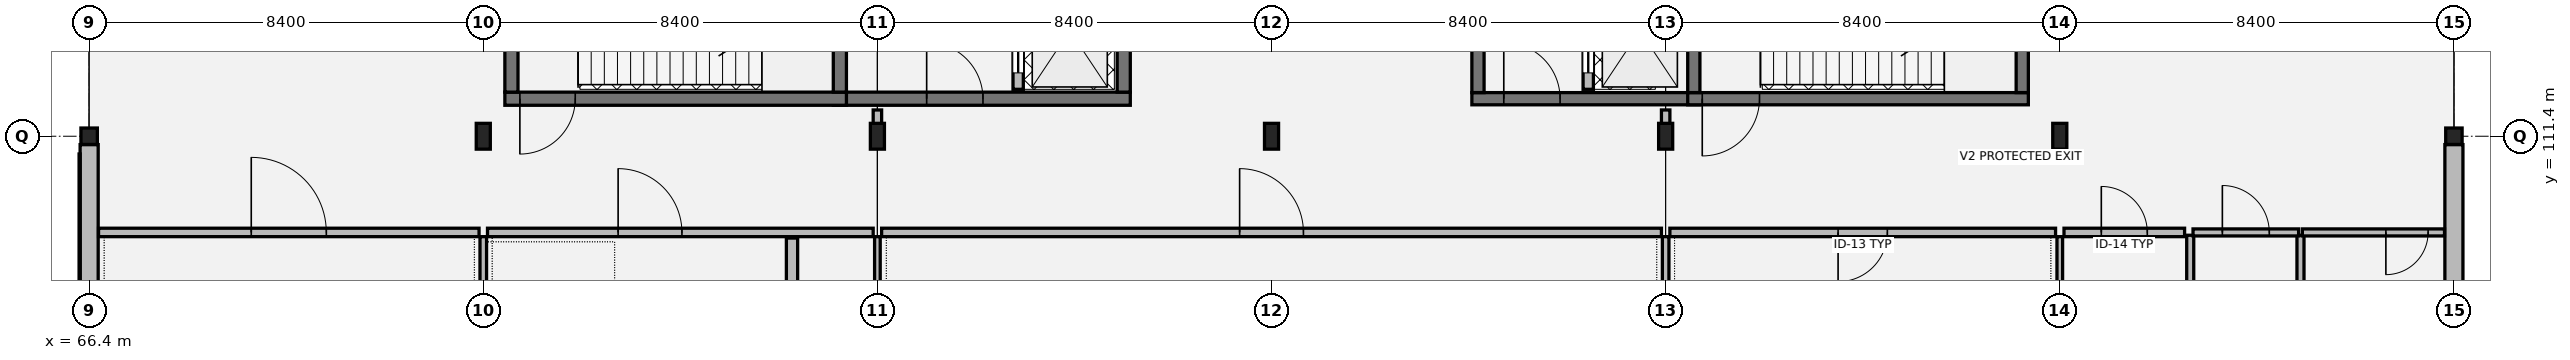
"""IFC4 building model, lengths in metres.
Left out: names, types, materials, properties, quantities, classifications, styles, units other than length and angle.
Written with IfcOpenShell. Run it as: python <this file> out.ifc"""

import sys

from ifc_helpers import new_model, si_unit, direction, frame, frame_2d, origin, origin_2d, place, context, subcontext, project, spatial, rectangle, hollow_rectangle, i_section, extrude, element, fill, save


model = new_model("IFC4")
c1 = context("Model", 3, precision=1e-05, world=origin(), true_north=direction((0.0, 1.0)))
c2 = subcontext(c1, "Body", "Model", "MODEL_VIEW")
j1 = project(units=[si_unit("LENGTHUNIT", "METRE"), si_unit("PLANEANGLEUNIT", "RADIAN")], contexts=[c1])
p1 = place(None, origin())
s1 = spatial("IfcSite", under=j1, at=p1, CompositionType="ELEMENT")
p2 = place(p1, origin())
s2 = spatial("IfcBuilding", under=s1, at=p2, CompositionType="ELEMENT")
p3 = place(p2, origin())
s3 = spatial("IfcBuildingStorey", under=s2, at=p3, CompositionType="ELEMENT", Elevation=0.0)
p4 = place(p3, frame((66.4, 111.4, 0.0), z_axis=(0.0, 0.0, 1.0), x_axis=(1.0, 0.0, 0.0)))
e1 = element("IfcColumn", 1, at=p4, inside=s3, PredefinedType="COLUMN", context=c2, shape_type="SweptSolid", body=[
    extrude(hollow_rectangle(XDim=0.35, YDim=0.35, WallThickness=0.014, at=origin_2d()), origin(), (0.0, 0.0, 1.0), 5.075),
])
for number, where, z_axis, x_axis in (
    (2, (74.8, 111.4, 0.0), (0.0, 0.0, 1.0), (1.0, 0.0, 0.0)),
    (3, (83.2, 111.4, 0.0), (0.0, 0.0, 1.0), (1.0, 0.0, 0.0)),
    (4, (91.6, 111.4, 0.0), (0.0, 0.0, 1.0), (1.0, 0.0, 0.0)),
    (5, (100.0, 111.4, 0.0), (0.0, 0.0, 1.0), (1.0, 0.0, 0.0)),
    (6, (108.4, 111.4, 0.0), (0.0, 0.0, 1.0), (1.0, 0.0, 0.0)),
):
    element("IfcColumn", number, at=place(p3, frame(where, z_axis=z_axis, x_axis=x_axis)), inside=s3, PredefinedType="COLUMN", context=c2, shape_type="SweptSolid", body=[
        extrude(i_section(OverallWidth=0.3, OverallDepth=0.55, WebThickness=0.015, FlangeThickness=0.029, at=origin_2d()), origin(), (0.0, 0.0, 1.0), 5.075),
    ])
p5 = place(p3, frame((116.8, 111.4, 0.0), z_axis=(0.0, 0.0, 1.0), x_axis=(1.0, 0.0, 0.0)))
e7 = element("IfcColumn", 7, at=p5, inside=s3, PredefinedType="COLUMN", context=c2, shape_type="SweptSolid", body=[
    extrude(hollow_rectangle(XDim=0.35, YDim=0.35, WallThickness=0.014, at=origin_2d()), origin(), (0.0, 0.0, 1.0), 5.075),
])
for number, where, z_axis, x_axis in (
    (8, (116.8, 103.978, 0.0), (0.0, 0.0, 1.0), (0.0, 1.0, 0.0)),
    (9, (66.4, 111.222, 0.0), (0.0, 0.0, 1.0), (0.0, -1.0, 0.0)),
):
    element("IfcWall", number, at=place(p3, frame(where, z_axis=z_axis, x_axis=x_axis)), inside=s3, PredefinedType="SOLIDWALL", context=c2, shape_type="SweptSolid", body=[
        extrude(rectangle(XDim=7.244, YDim=0.385, at=frame_2d((3.622, 0.0))), origin(), (0.0, 0.0, 1.0), 4.5),
    ])
p6 = place(p3, frame((82.26, 112.2, 0.0), z_axis=(0.0, 0.0, 1.0), x_axis=(1.0, 0.0, 0.0)))
e10 = element("IfcWall", 10, at=p6, inside=s3, PredefinedType="SHEAR", context=c2, shape_type="SweptSolid", body=[
    extrude(rectangle(XDim=6.33, YDim=0.28, at=frame_2d((3.165, 0.0))), origin(), (0.0, 0.0, 1.0), 4.865),
])
p7 = place(p6, frame((1.99, 0.0, 0.0)))
e11 = element("IfcOpeningElement", 11, at=p7, cuts=e10, PredefinedType="OPENING", context=c2, shape_type="SweptSolid", body=[
    extrude(rectangle(XDim=1.2, YDim=2.16, at=frame_2d((0.6, 1.08))), frame((0.0, 0.15, 0.0), z_axis=(0.0, -1.0, 0.0), x_axis=(1.0, 0.0, 0.0)), (0.0, 0.0, 1.0), 0.3),
])
p8 = place(p3, frame((88.45, 112.34, 0.0), z_axis=(0.0, 0.0, 1.0), x_axis=(0.0, 1.0, 0.0)))
e12 = element("IfcWall", 12, at=p8, inside=s3, PredefinedType="SHEAR", context=c2, shape_type="SweptSolid", body=[
    extrude(rectangle(XDim=5.72, YDim=0.28, at=frame_2d((2.86, 0.0))), origin(), (0.0, 0.0, 1.0), 4.865),
])
p9 = place(p3, frame((86.2, 112.4, 0.0), z_axis=(0.0, 0.0, 1.0), x_axis=(0.0, 1.0, 0.0)))
e13 = element("IfcWall", 13, at=p9, inside=s3, PredefinedType="SOLIDWALL", context=c2, shape_type="SweptSolid", body=[
    extrude(rectangle(XDim=5.6, YDim=0.22, at=frame_2d((2.8, 0.0))), origin(), (0.0, 0.0, 1.0), 4.865),
])
p10 = place(p9, frame((0.35, 0.0, 0.0)))
e14 = element("IfcOpeningElement", 14, at=p10, cuts=e13, PredefinedType="OPENING", context=c2, shape_type="SweptSolid", body=[
    extrude(rectangle(XDim=1.1, YDim=2.15, at=frame_2d((0.55, 1.075))), frame((0.0, 0.12, 0.0), z_axis=(0.0, -1.0, 0.0), x_axis=(1.0, 0.0, 0.0)), (0.0, 0.0, 1.0), 0.24),
])
p11 = place(p9, frame((2.4, 0.0, 0.0)))
e15 = element("IfcOpeningElement", 15, at=p11, cuts=e13, PredefinedType="OPENING", context=c2, shape_type="SweptSolid", body=[
    extrude(rectangle(XDim=1.1, YDim=2.15, at=frame_2d((0.55, 1.075))), frame((0.0, 0.12, 0.0), z_axis=(0.0, -1.0, 0.0), x_axis=(1.0, 0.0, 0.0)), (0.0, 0.0, 1.0), 0.24),
])
p12 = place(p3, frame((75.26, 112.2, 0.0), z_axis=(0.0, 0.0, 1.0), x_axis=(1.0, 0.0, 0.0)))
e16 = element("IfcWall", 16, at=p12, inside=s3, PredefinedType="SHEAR", context=c2, shape_type="SweptSolid", body=[
    extrude(rectangle(XDim=7.28, YDim=0.28, at=frame_2d((3.64, 0.0))), origin(), (0.0, 0.0, 1.0), 4.865),
])
p13 = place(p12, frame((0.32, 0.0, 0.0)))
e17 = element("IfcOpeningElement", 17, at=p13, cuts=e16, PredefinedType="OPENING", context=c2, shape_type="SweptSolid", body=[
    extrude(rectangle(XDim=1.18, YDim=2.18, at=frame_2d((0.59, 1.09))), frame((0.0, 0.15, 0.0), z_axis=(0.0, -1.0, 0.0), x_axis=(1.0, 0.0, 0.0)), (0.0, 0.0, 1.0), 0.3),
])
for number, where, z_axis, x_axis in (
    (18, (75.4, 112.34, 0.0), (0.0, 0.0, 1.0), (0.0, 1.0, 0.0)),
    (19, (82.4, 112.34, 0.0), (0.0, 0.0, 1.0), (0.0, 1.0, 0.0)),
):
    element("IfcWall", number, at=place(p3, frame(where, z_axis=z_axis, x_axis=x_axis)), inside=s3, PredefinedType="SHEAR", context=c2, shape_type="SweptSolid", body=[
        extrude(rectangle(XDim=5.72, YDim=0.28, at=frame_2d((2.86, 0.0))), origin(), (0.0, 0.0, 1.0), 4.865),
    ])
p14 = place(p3, frame((95.87, 112.2, 0.0), z_axis=(0.0, 0.0, 1.0), x_axis=(1.0, 0.0, 0.0)))
e20 = element("IfcWall", 20, at=p14, inside=s3, PredefinedType="SHEAR", context=c2, shape_type="SweptSolid", body=[
    extrude(rectangle(XDim=4.86, YDim=0.26, at=frame_2d((2.43, 0.0))), origin(), (0.0, 0.0, 1.0), 4.865),
])
p15 = place(p14, frame((0.68, 0.0, 0.0)))
e21 = element("IfcOpeningElement", 21, at=p15, cuts=e20, PredefinedType="OPENING", context=c2, shape_type="SweptSolid", body=[
    extrude(rectangle(XDim=1.2, YDim=2.16, at=frame_2d((0.6, 1.08))), frame((0.0, 0.14, 0.0), z_axis=(0.0, -1.0, 0.0), x_axis=(1.0, 0.0, 0.0)), (0.0, 0.0, 1.0), 0.28),
])
p16 = place(p3, frame((96.0, 118.07, 0.0), z_axis=(0.0, 0.0, 1.0), x_axis=(0.0, -1.0, 0.0)))
e22 = element("IfcWall", 22, at=p16, inside=s3, PredefinedType="SHEAR", context=c2, shape_type="SweptSolid", body=[
    extrude(rectangle(XDim=5.74, YDim=0.26, at=frame_2d((2.87, 0.0))), origin(), (0.0, 0.0, 1.0), 4.865),
])
p17 = place(p3, frame((98.35, 112.4, 0.0), z_axis=(0.0, 0.0, 1.0), x_axis=(0.0, 1.0, 0.0)))
e23 = element("IfcWall", 23, at=p17, inside=s3, PredefinedType="SOLIDWALL", context=c2, shape_type="SweptSolid", body=[
    extrude(rectangle(XDim=5.6, YDim=0.22, at=frame_2d((2.8, 0.0))), origin(), (0.0, 0.0, 1.0), 4.865),
])
p18 = place(p17, frame((0.35, 0.0, 0.0)))
e24 = element("IfcOpeningElement", 24, at=p18, cuts=e23, PredefinedType="OPENING", context=c2, shape_type="SweptSolid", body=[
    extrude(rectangle(XDim=1.1, YDim=2.15, at=frame_2d((0.55, 1.075))), frame((0.0, 0.12, 0.0), z_axis=(0.0, -1.0, 0.0), x_axis=(1.0, 0.0, 0.0)), (0.0, 0.0, 1.0), 0.24),
])
p19 = place(p3, frame((100.47, 112.2, 0.0), z_axis=(0.0, 0.0, 1.0), x_axis=(1.0, 0.0, 0.0)))
e25 = element("IfcWall", 25, at=p19, inside=s3, PredefinedType="SHEAR", context=c2, shape_type="SweptSolid", body=[
    extrude(rectangle(XDim=7.26, YDim=0.26, at=frame_2d((3.63, 0.0))), origin(), (0.0, 0.0, 1.0), 4.865),
])
p20 = place(p19, frame((0.31, 0.0, 0.0)))
e26 = element("IfcOpeningElement", 26, at=p20, cuts=e25, PredefinedType="OPENING", context=c2, shape_type="SweptSolid", body=[
    extrude(rectangle(XDim=1.22, YDim=2.18, at=frame_2d((0.61, 1.09))), frame((0.0, 0.14, 0.0), z_axis=(0.0, -1.0, 0.0), x_axis=(1.0, 0.0, 0.0)), (0.0, 0.0, 1.0), 0.28),
])
for number, where, z_axis, x_axis in (
    (27, (100.6, 112.33, 0.0), (0.0, 0.0, 1.0), (0.0, 1.0, 0.0)),
    (28, (107.6, 112.33, 0.0), (0.0, 0.0, 1.0), (0.0, 1.0, 0.0)),
):
    element("IfcWall", number, at=place(p3, frame(where, z_axis=z_axis, x_axis=x_axis)), inside=s3, PredefinedType="SHEAR", context=c2, shape_type="SweptSolid", body=[
        extrude(rectangle(XDim=5.74, YDim=0.26, at=frame_2d((2.87, 0.0))), origin(), (0.0, 0.0, 1.0), 4.865),
    ])
for number, where, z_axis, x_axis in (
    (29, (111.18, 106.93, 0.0), (0.0, 0.0, 1.0), (0.0, 1.0, 0.0)),
    (30, (113.53, 106.93, 0.0), (0.0, 0.0, 1.0), (0.0, 1.0, 0.0)),
):
    element("IfcWall", number, at=place(p3, frame(where, z_axis=z_axis, x_axis=x_axis)), inside=s3, PredefinedType="PARTITIONING", context=c2, shape_type="SweptSolid", body=[
        extrude(rectangle(XDim=2.36, YDim=0.15, at=frame_2d((1.18, 0.0))), origin(), (0.0, 0.0, 1.0), 4.2),
    ])
p21 = place(p3, frame((111.24, 109.35, 0.0), z_axis=(0.0, 0.0, 1.0), x_axis=(1.0, 0.0, 0.0)))
e31 = element("IfcWall", 31, at=p21, inside=s3, PredefinedType="PARTITIONING", context=c2, shape_type="SweptSolid", body=[
    extrude(rectangle(XDim=2.25, YDim=0.15, at=frame_2d((1.125, 0.0))), origin(), (0.0, 0.0, 1.0), 4.2),
])
p22 = place(p21, frame((0.625, 0.0, 0.0)))
e32 = element("IfcOpeningElement", 32, at=p22, cuts=e31, PredefinedType="OPENING", context=c2, shape_type="SweptSolid", body=[
    extrude(rectangle(XDim=1.0, YDim=2.15, at=frame_2d((0.5, 1.075))), frame((0.0, 0.085, 0.0), z_axis=(0.0, -1.0, 0.0), x_axis=(1.0, 0.0, 0.0)), (0.0, 0.0, 1.0), 0.17),
])
p23 = place(p3, frame((113.57, 109.35, 0.0), z_axis=(0.0, 0.0, 1.0), x_axis=(1.0, 0.0, 0.0)))
e33 = element("IfcWall", 33, at=p23, inside=s3, PredefinedType="PARTITIONING", context=c2, shape_type="SweptSolid", body=[
    extrude(rectangle(XDim=3.03, YDim=0.15, at=frame_2d((1.515, 0.0))), origin(), (0.0, 0.0, 1.0), 4.2),
])
p24 = place(p23, frame((1.78, 0.0, 0.0)))
e34 = element("IfcOpeningElement", 34, at=p24, cuts=e33, PredefinedType="OPENING", context=c2, shape_type="SweptSolid", body=[
    extrude(rectangle(XDim=0.9, YDim=2.15, at=frame_2d((0.45, 1.075))), frame((0.0, 0.085, 0.0), z_axis=(0.0, -1.0, 0.0), x_axis=(1.0, 0.0, 0.0)), (0.0, 0.0, 1.0), 0.17),
])
p25 = place(p3, frame((66.6, 109.35, 0.0), z_axis=(0.0, 0.0, 1.0), x_axis=(1.0, 0.0, 0.0)))
e35 = element("IfcWall", 35, at=p25, inside=s3, PredefinedType="PARTITIONING", context=c2, shape_type="SweptSolid", body=[
    extrude(rectangle(XDim=8.11, YDim=0.18, at=frame_2d((4.055, 0.0))), origin(), (0.0, 0.0, 1.0), 4.2),
])
p26 = place(p25, frame((3.255, 0.0, 0.0)))
e36 = element("IfcOpeningElement", 36, at=p26, cuts=e35, PredefinedType="OPENING", context=c2, shape_type="SweptSolid", body=[
    extrude(rectangle(XDim=1.6, YDim=2.25, at=frame_2d((0.8, 1.125))), frame((0.0, 0.1, 0.0), z_axis=(0.0, -1.0, 0.0), x_axis=(1.0, 0.0, 0.0)), (0.0, 0.0, 1.0), 0.2),
])
p27 = place(p3, frame((74.89, 109.35, 0.0), z_axis=(0.0, 0.0, 1.0), x_axis=(1.0, 0.0, 0.0)))
e37 = element("IfcWall", 37, at=p27, inside=s3, PredefinedType="PARTITIONING", context=c2, shape_type="SweptSolid", body=[
    extrude(rectangle(XDim=8.22, YDim=0.18, at=frame_2d((4.11, 0.0))), origin(), (0.0, 0.0, 1.0), 4.2),
])
p28 = place(p27, frame((2.784, 0.0, 0.0)))
e38 = element("IfcOpeningElement", 38, at=p28, cuts=e37, PredefinedType="OPENING", context=c2, shape_type="SweptSolid", body=[
    extrude(rectangle(XDim=1.36, YDim=2.2, at=frame_2d((0.68, 1.1))), frame((0.0, 0.1, 0.0), z_axis=(0.0, -1.0, 0.0), x_axis=(1.0, 0.0, 0.0)), (0.0, 0.0, 1.0), 0.2),
])
p29 = place(p3, frame((83.29, 109.35, 0.0), z_axis=(0.0, 0.0, 1.0), x_axis=(1.0, 0.0, 0.0)))
e39 = element("IfcWall", 39, at=p29, inside=s3, PredefinedType="PARTITIONING", context=c2, shape_type="SweptSolid", body=[
    extrude(rectangle(XDim=16.62, YDim=0.18, at=frame_2d((8.31, 0.0))), origin(), (0.0, 0.0, 1.0), 4.2),
])
p30 = place(p29, frame((7.63, 0.0, 0.0)))
e40 = element("IfcOpeningElement", 40, at=p30, cuts=e39, PredefinedType="OPENING", context=c2, shape_type="SweptSolid", body=[
    extrude(rectangle(XDim=1.36, YDim=2.2, at=frame_2d((0.68, 1.1))), frame((0.0, 0.1, 0.0), z_axis=(0.0, -1.0, 0.0), x_axis=(1.0, 0.0, 0.0)), (0.0, 0.0, 1.0), 0.2),
])
p31 = place(p3, frame((100.09, 109.35, 0.0), z_axis=(0.0, 0.0, 1.0), x_axis=(1.0, 0.0, 0.0)))
e41 = element("IfcWall", 41, at=p31, inside=s3, PredefinedType="PARTITIONING", context=c2, shape_type="SweptSolid", body=[
    extrude(rectangle(XDim=8.22, YDim=0.18, at=frame_2d((4.11, 0.0))), origin(), (0.0, 0.0, 1.0), 4.2),
])
p32 = place(p31, frame((3.585, 0.0, 0.0)))
e42 = element("IfcOpeningElement", 42, at=p32, cuts=e41, PredefinedType="OPENING", context=c2, shape_type="SweptSolid", body=[
    extrude(rectangle(XDim=1.05, YDim=2.15, at=frame_2d((0.525, 1.075))), frame((0.0, 0.1, 0.0), z_axis=(0.0, -1.0, 0.0), x_axis=(1.0, 0.0, 0.0)), (0.0, 0.0, 1.0), 0.2),
])
p33 = place(p3, frame((108.49, 109.35, 0.0), z_axis=(0.0, 0.0, 1.0), x_axis=(1.0, 0.0, 0.0)))
e43 = element("IfcWall", 43, at=p33, inside=s3, PredefinedType="PARTITIONING", context=c2, shape_type="SweptSolid", body=[
    extrude(rectangle(XDim=2.57, YDim=0.18, at=frame_2d((1.285, 0.0))), origin(), (0.0, 0.0, 1.0), 4.2),
])
p34 = place(p33, frame((0.795, 0.0, 0.0)))
e44 = element("IfcOpeningElement", 44, at=p34, cuts=e43, PredefinedType="OPENING", context=c2, shape_type="SweptSolid", body=[
    extrude(rectangle(XDim=0.98, YDim=2.15, at=frame_2d((0.49, 1.075))), frame((0.0, 0.1, 0.0), z_axis=(0.0, -1.0, 0.0), x_axis=(1.0, 0.0, 0.0)), (0.0, 0.0, 1.0), 0.2),
])
for number, where, z_axis, x_axis in (
    (45, (83.2, 111.64, 0.0), (0.0, 0.0, 1.0), (0.0, 1.0, 0.0)),
    (46, (100.0, 111.64, 0.0), (0.0, 0.0, 1.0), (0.0, 1.0, 0.0)),
):
    element("IfcWall", number, at=place(p3, frame(where, z_axis=z_axis, x_axis=x_axis)), inside=s3, PredefinedType="PARTITIONING", context=c2, shape_type="SweptSolid", body=[
        extrude(rectangle(XDim=0.32, YDim=0.18, at=frame_2d((0.16, 0.0))), origin(), (0.0, 0.0, 1.0), 4.2),
    ])
p35 = place(p3, frame((74.8, 81.32, 0.0), z_axis=(0.0, 0.0, 1.0), x_axis=(0.0, 1.0, 0.0)))
e47 = element("IfcWall", 47, at=p35, inside=s3, PredefinedType="PARTITIONING", context=c2, shape_type="SweptSolid", body=[
    extrude(rectangle(XDim=27.94, YDim=0.14, at=frame_2d((13.97, 0.0))), origin(), (0.0, 0.0, 1.0), 4.2),
])
p36 = place(p35, frame((12.89, 0.0, 0.0)))
e48 = element("IfcOpeningElement", 48, at=p36, cuts=e47, PredefinedType="OPENING", context=c2, shape_type="SweptSolid", body=[
    extrude(rectangle(XDim=1.26, YDim=2.2, at=frame_2d((0.63, 1.1))), frame((0.0, 0.08, 0.0), z_axis=(0.0, -1.0, 0.0), x_axis=(1.0, 0.0, 0.0)), (0.0, 0.0, 1.0), 0.16),
])
p37 = place(p3, frame((83.2, 81.32, 0.0), z_axis=(0.0, 0.0, 1.0), x_axis=(0.0, 1.0, 0.0)))
e49 = element("IfcWall", 49, at=p37, inside=s3, PredefinedType="PARTITIONING", context=c2, shape_type="SweptSolid", body=[
    extrude(rectangle(XDim=27.94, YDim=0.12, at=frame_2d((13.97, 0.0))), origin(), (0.0, 0.0, 1.0), 4.2),
])
p38 = place(p3, frame((100.0, 81.32, 0.0), z_axis=(0.0, 0.0, 1.0), x_axis=(0.0, 1.0, 0.0)))
e50 = element("IfcWall", 50, at=p38, inside=s3, PredefinedType="PARTITIONING", context=c2, shape_type="SweptSolid", body=[
    extrude(rectangle(XDim=27.94, YDim=0.14, at=frame_2d((13.97, 0.0))), origin(), (0.0, 0.0, 1.0), 4.2),
])
p39 = place(p3, frame((108.4, 81.32, 0.0), z_axis=(0.0, 0.0, 1.0), x_axis=(0.0, 1.0, 0.0)))
e51 = element("IfcWall", 51, at=p39, inside=s3, PredefinedType="PARTITIONING", context=c2, shape_type="SweptSolid", body=[
    extrude(rectangle(XDim=27.94, YDim=0.12, at=frame_2d((13.97, 0.0))), origin(), (0.0, 0.0, 1.0), 4.2),
])
p40 = place(p3, frame((81.38, 103.57, 0.0), z_axis=(0.0, 0.0, 1.0), x_axis=(0.0, 1.0, 0.0)))
e52 = element("IfcWall", 52, at=p40, inside=s3, PredefinedType="SOLIDWALL", context=c2, shape_type="SweptSolid", body=[
    extrude(rectangle(XDim=5.66, YDim=0.24, at=frame_2d((2.83, 0.0))), origin(), (0.0, 0.0, 1.0), 4.2),
])
p41 = place(p7, origin())
e53 = element("IfcDoor", 53, at=p41, inside=s3, OperationType="SINGLE_SWING_LEFT", PredefinedType="DOOR", context=c2, shape_type="SweptSolid", body=[
    extrude(rectangle(XDim=1.2, YDim=2.16, at=frame_2d((0.6, 1.08))), frame((0.0, 0.025, 0.0), z_axis=(0.0, -1.0, 0.0), x_axis=(1.0, 0.0, 0.0)), (0.0, 0.0, 1.0), 0.05),
])
fill(e11, e53)
p42 = place(p10, origin())
e54 = element("IfcDoor", 54, at=p42, inside=s3, OperationType="SLIDING_TO_LEFT", PredefinedType="DOOR", context=c2, shape_type="SweptSolid", body=[
    extrude(rectangle(XDim=1.1, YDim=2.15, at=frame_2d((0.55, 1.075))), frame((0.0, 0.025, 0.0), z_axis=(0.0, -1.0, 0.0), x_axis=(1.0, 0.0, 0.0)), (0.0, 0.0, 1.0), 0.05),
])
fill(e14, e54)
p43 = place(p13, origin())
e55 = element("IfcDoor", 55, at=p43, inside=s3, OperationType="SINGLE_SWING_RIGHT", PredefinedType="DOOR", context=c2, shape_type="SweptSolid", body=[
    extrude(rectangle(XDim=1.18, YDim=2.18, at=frame_2d((0.59, 1.09))), frame((0.0, 0.025, 0.0), z_axis=(0.0, -1.0, 0.0), x_axis=(1.0, 0.0, 0.0)), (0.0, 0.0, 1.0), 0.05),
])
fill(e17, e55)
p44 = place(p15, origin())
e56 = element("IfcDoor", 56, at=p44, inside=s3, OperationType="SINGLE_SWING_LEFT", PredefinedType="DOOR", context=c2, shape_type="SweptSolid", body=[
    extrude(rectangle(XDim=1.2, YDim=2.16, at=frame_2d((0.6, 1.08))), frame((0.0, 0.025, 0.0), z_axis=(0.0, -1.0, 0.0), x_axis=(1.0, 0.0, 0.0)), (0.0, 0.0, 1.0), 0.05),
])
fill(e21, e56)
p45 = place(p18, origin())
e57 = element("IfcDoor", 57, at=p45, inside=s3, OperationType="SLIDING_TO_LEFT", PredefinedType="DOOR", context=c2, shape_type="SweptSolid", body=[
    extrude(rectangle(XDim=1.1, YDim=2.15, at=frame_2d((0.55, 1.075))), frame((0.0, 0.025, 0.0), z_axis=(0.0, -1.0, 0.0), x_axis=(1.0, 0.0, 0.0)), (0.0, 0.0, 1.0), 0.05),
])
fill(e24, e57)
p46 = place(p20, origin())
e58 = element("IfcDoor", 58, at=p46, inside=s3, OperationType="SINGLE_SWING_RIGHT", PredefinedType="DOOR", context=c2, shape_type="SweptSolid", body=[
    extrude(rectangle(XDim=1.22, YDim=2.18, at=frame_2d((0.61, 1.09))), frame((0.0, 0.025, 0.0), z_axis=(0.0, -1.0, 0.0), x_axis=(1.0, 0.0, 0.0)), (0.0, 0.0, 1.0), 0.05),
])
fill(e26, e58)
p47 = place(p22, origin())
e59 = element("IfcDoor", 59, at=p47, inside=s3, OperationType="SINGLE_SWING_LEFT", PredefinedType="DOOR", context=c2, shape_type="SweptSolid", body=[
    extrude(rectangle(XDim=1.0, YDim=2.15, at=frame_2d((0.5, 1.075))), frame((0.0, 0.025, 0.0), z_axis=(0.0, -1.0, 0.0), x_axis=(1.0, 0.0, 0.0)), (0.0, 0.0, 1.0), 0.05),
])
fill(e32, e59)
p48 = place(p24, origin())
e60 = element("IfcDoor", 60, at=p48, inside=s3, OperationType="SINGLE_SWING_RIGHT", PredefinedType="DOOR", context=c2, shape_type="SweptSolid", body=[
    extrude(rectangle(XDim=0.9, YDim=2.15, at=frame_2d((0.45, 1.075))), frame((0.0, 0.025, 0.0), z_axis=(0.0, -1.0, 0.0), x_axis=(1.0, 0.0, 0.0)), (0.0, 0.0, 1.0), 0.05),
])
fill(e34, e60)
p49 = place(p26, origin())
e61 = element("IfcDoor", 61, at=p49, inside=s3, OperationType="DOUBLE_DOOR_SINGLE_SWING", PredefinedType="DOOR", context=c2, shape_type="SweptSolid", body=[
    extrude(rectangle(XDim=1.6, YDim=2.25, at=frame_2d((0.8, 1.125))), frame((0.0, 0.025, 0.0), z_axis=(0.0, -1.0, 0.0), x_axis=(1.0, 0.0, 0.0)), (0.0, 0.0, 1.0), 0.05),
])
fill(e36, e61)
p50 = place(p28, origin())
e62 = element("IfcDoor", 62, at=p50, inside=s3, OperationType="SINGLE_SWING_LEFT", PredefinedType="DOOR", context=c2, shape_type="SweptSolid", body=[
    extrude(rectangle(XDim=1.36, YDim=2.2, at=frame_2d((0.68, 1.1))), frame((0.0, 0.025, 0.0), z_axis=(0.0, -1.0, 0.0), x_axis=(1.0, 0.0, 0.0)), (0.0, 0.0, 1.0), 0.05),
])
fill(e38, e62)
p51 = place(p30, origin())
e63 = element("IfcDoor", 63, at=p51, inside=s3, OperationType="SINGLE_SWING_LEFT", PredefinedType="DOOR", context=c2, shape_type="SweptSolid", body=[
    extrude(rectangle(XDim=1.36, YDim=2.2, at=frame_2d((0.68, 1.1))), frame((0.0, 0.025, 0.0), z_axis=(0.0, -1.0, 0.0), x_axis=(1.0, 0.0, 0.0)), (0.0, 0.0, 1.0), 0.05),
])
fill(e40, e63)
p52 = place(p32, origin())
e64 = element("IfcDoor", 64, at=p52, inside=s3, OperationType="SINGLE_SWING_RIGHT", PredefinedType="DOOR", context=c2, shape_type="SweptSolid", body=[
    extrude(rectangle(XDim=1.05, YDim=2.15, at=frame_2d((0.525, 1.075))), frame((0.0, 0.025, 0.0), z_axis=(0.0, -1.0, 0.0), x_axis=(1.0, 0.0, 0.0)), (0.0, 0.0, 1.0), 0.05),
])
fill(e42, e64)
p53 = place(p34, origin())
e65 = element("IfcDoor", 65, at=p53, inside=s3, OperationType="SINGLE_SWING_LEFT", PredefinedType="DOOR", context=c2, shape_type="SweptSolid", body=[
    extrude(rectangle(XDim=0.98, YDim=2.15, at=frame_2d((0.49, 1.075))), frame((0.0, 0.025, 0.0), z_axis=(0.0, -1.0, 0.0), x_axis=(1.0, 0.0, 0.0)), (0.0, 0.0, 1.0), 0.05),
])
fill(e44, e65)
save(model, sys.argv[1])
